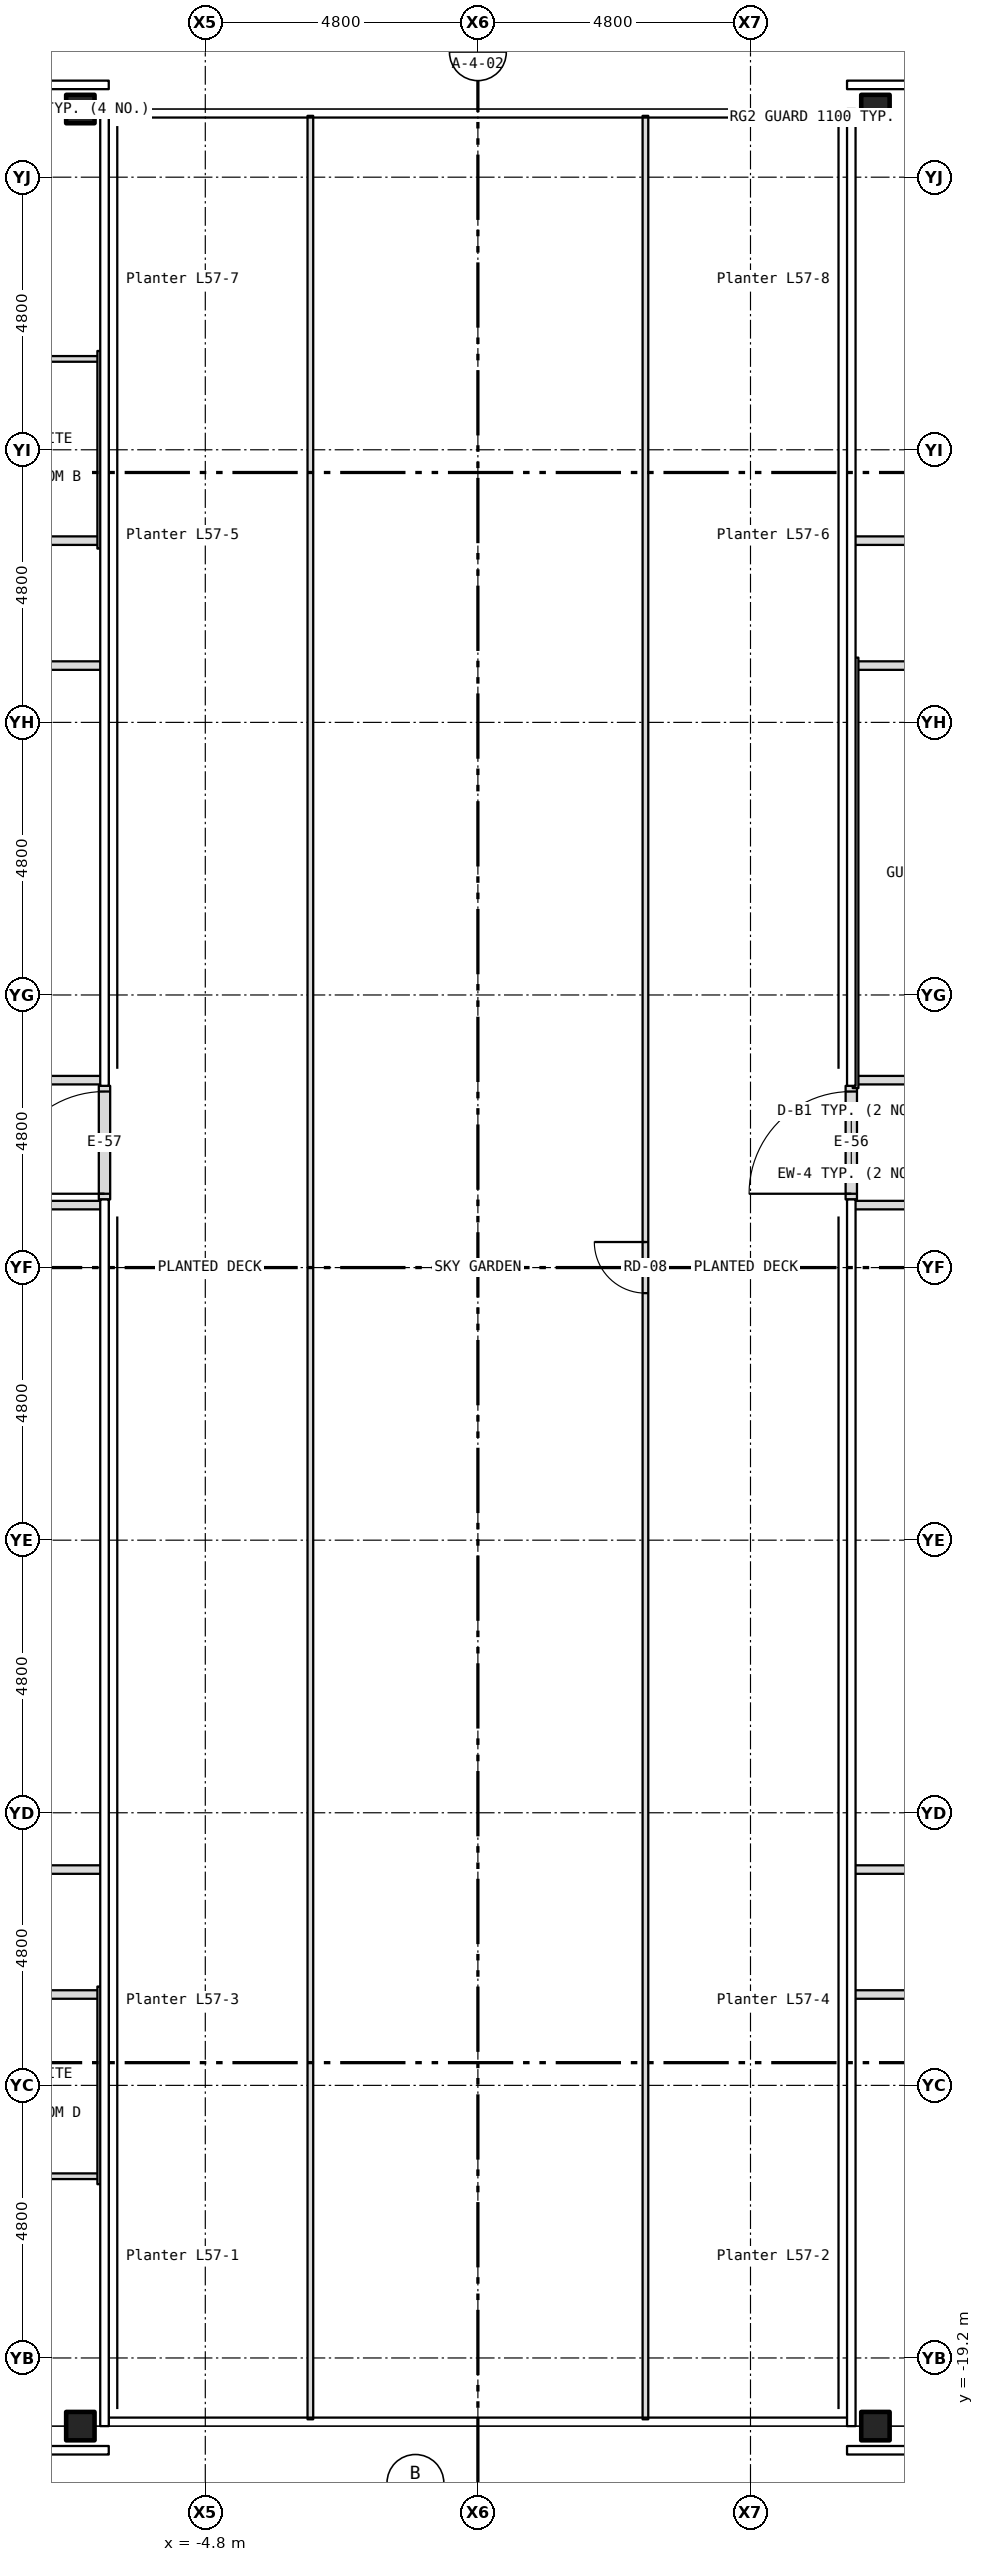
"""IFC4 building model, lengths in metres.
Left out: names, types, materials, properties, quantities, classifications, styles, units other than length and angle.
Written with IfcOpenShell. Run it as: python <this file> out.ifc"""

import sys

from ifc_helpers import new_model, si_unit, direction, frame, frame_2d, origin, origin_2d, place, context, subcontext, project, spatial, rectangle, hollow_rectangle, extrude, element, fill, save


model = new_model("IFC4")
c1 = context("Model", 3, precision=1e-05, world=origin(), true_north=direction((0.0, 1.0)))
c2 = subcontext(c1, "Body", "Model", "MODEL_VIEW")
j1 = project(units=[si_unit("LENGTHUNIT", "METRE"), si_unit("PLANEANGLEUNIT", "RADIAN")], contexts=[c1])
p1 = place(None, origin())
s1 = spatial("IfcSite", under=j1, at=p1, CompositionType="ELEMENT")
p2 = place(p1, origin())
s2 = spatial("IfcBuilding", under=s1, at=p2, CompositionType="ELEMENT")
p3 = place(p2, frame((0.0, 0.0, 219.0)))
s3 = spatial("IfcBuildingStorey", under=s2, at=p3, CompositionType="ELEMENT", Elevation=219.0)
for number, where, z_axis, x_axis in (
    (1, (-7.0, 20.4, -0.15), (0.0, 0.0, 1.0), (1.0, 0.0, 0.0)),
    (2, (-7.0, -20.4, -0.15), (0.0, 0.0, 1.0), (1.0, 0.0, 0.0)),
    (3, (7.0, 20.4, -0.15), (0.0, 0.0, 1.0), (1.0, 0.0, 0.0)),
    (4, (7.0, -20.4, -0.15), (0.0, 0.0, 1.0), (1.0, 0.0, 0.0)),
):
    element("IfcColumn", number, at=place(p3, frame(where, z_axis=z_axis, x_axis=x_axis)), inside=s3, PredefinedType="COLUMN", context=c2, shape_type="SweptSolid", body=[
        extrude(hollow_rectangle(XDim=0.5, YDim=0.5, WallThickness=0.03, at=origin_2d()), origin(), (0.0, 0.0, 1.0), 3.5),
    ])
p4 = place(p3, frame((6.575, 1.2, 0.0), z_axis=(0.0, 0.0, 1.0), x_axis=(0.0, 1.0, 0.0)))
e5 = element("IfcWall", 5, at=p4, inside=s3, PredefinedType="SOLIDWALL", context=c2, shape_type="SweptSolid", body=[
    extrude(rectangle(XDim=2.0, YDim=0.2, at=frame_2d((1.0, 0.0))), origin(), (0.0, 0.0, 1.0), 2.593),
])
p5 = place(p4, frame((0.1, 0.0, 0.0)))
e6 = element("IfcOpeningElement", 6, at=p5, cuts=e5, PredefinedType="OPENING", context=c2, shape_type="SweptSolid", body=[
    extrude(rectangle(XDim=1.8, YDim=2.1, at=frame_2d((0.9, 1.05))), frame((0.0, 0.112, 0.0), z_axis=(0.0, -1.0, 0.0), x_axis=(1.0, 0.0, 0.0)), (0.0, 0.0, 1.0), 0.224),
])
p6 = place(p3, frame((-6.575, 1.2, 0.0), z_axis=(0.0, 0.0, 1.0), x_axis=(0.0, 1.0, 0.0)))
e7 = element("IfcWall", 7, at=p6, inside=s3, PredefinedType="SOLIDWALL", context=c2, shape_type="SweptSolid", body=[
    extrude(rectangle(XDim=2.0, YDim=0.2, at=frame_2d((1.0, 0.0))), origin(), (0.0, 0.0, 1.0), 2.593),
])
p7 = place(p6, frame((0.1, 0.0, 0.0)))
e8 = element("IfcOpeningElement", 8, at=p7, cuts=e7, PredefinedType="OPENING", context=c2, shape_type="SweptSolid", body=[
    extrude(rectangle(XDim=1.8, YDim=2.1, at=frame_2d((0.9, 1.05))), frame((0.0, 0.112, 0.0), z_axis=(0.0, -1.0, 0.0), x_axis=(1.0, 0.0, 0.0)), (0.0, 0.0, 1.0), 0.224),
])
p8 = place(p3, frame((-8.85, -16.0, 0.0), z_axis=(0.0, 0.0, 1.0), x_axis=(1.0, 0.0, 0.0)))
e9 = element("IfcWall", 9, at=p8, inside=s3, PredefinedType="PARTITIONING", context=c2, shape_type="SweptSolid", body=[
    extrude(rectangle(XDim=2.2, YDim=0.1, at=frame_2d((1.1, 0.0))), origin(), (0.0, 0.0, 1.0), 3.35),
])
p9 = place(p3, frame((-15.8, -12.8, 0.0), z_axis=(0.0, 0.0, 1.0), x_axis=(1.0, 0.0, 0.0)))
e10 = element("IfcWall", 10, at=p9, inside=s3, PredefinedType="PARTITIONING", context=c2, shape_type="SweptSolid", body=[
    extrude(rectangle(XDim=9.15, YDim=0.15, at=frame_2d((4.575, 0.0))), origin(), (0.0, 0.0, 1.0), 3.35),
])
p10 = place(p9, frame((4.667, 0.0, 0.0)))
e11 = element("IfcOpeningElement", 11, at=p10, cuts=e10, PredefinedType="OPENING", context=c2, shape_type="SweptSolid", body=[
    extrude(rectangle(XDim=1.0, YDim=2.1, at=frame_2d((0.5, 1.05))), frame((0.0, 0.087, 0.0), z_axis=(0.0, -1.0, 0.0), x_axis=(1.0, 0.0, 0.0)), (0.0, 0.0, 1.0), 0.174),
])
p11 = place(p9, frame((1.192, 0.0, 0.0)))
e12 = element("IfcOpeningElement", 12, at=p11, cuts=e10, PredefinedType="OPENING", context=c2, shape_type="SweptSolid", body=[
    extrude(rectangle(XDim=1.0, YDim=2.1, at=frame_2d((0.5, 1.05))), frame((0.0, 0.087, 0.0), z_axis=(0.0, -1.0, 0.0), x_axis=(1.0, 0.0, 0.0)), (0.0, 0.0, 1.0), 0.174),
])
p12 = place(p3, frame((6.62, -12.8, 0.0), z_axis=(0.0, 0.0, 1.0), x_axis=(1.0, 0.0, 0.0)))
e13 = element("IfcWall", 13, at=p12, inside=s3, PredefinedType="PARTITIONING", context=c2, shape_type="SweptSolid", body=[
    extrude(rectangle(XDim=9.18, YDim=0.15, at=frame_2d((4.59, 0.0))), origin(), (0.0, 0.0, 1.0), 3.35),
])
p13 = place(p12, frame((1.314, 0.0, 0.0)))
e14 = element("IfcOpeningElement", 14, at=p13, cuts=e13, PredefinedType="OPENING", context=c2, shape_type="SweptSolid", body=[
    extrude(rectangle(XDim=1.0, YDim=2.1, at=frame_2d((0.5, 1.05))), frame((0.0, 0.087, 0.0), z_axis=(0.0, -1.0, 0.0), x_axis=(1.0, 0.0, 0.0)), (0.0, 0.0, 1.0), 0.174),
])
p14 = place(p12, frame((6.988, 0.0, 0.0)))
e15 = element("IfcOpeningElement", 15, at=p14, cuts=e13, PredefinedType="OPENING", context=c2, shape_type="SweptSolid", body=[
    extrude(rectangle(XDim=1.0, YDim=2.1, at=frame_2d((0.5, 1.05))), frame((0.0, 0.087, 0.0), z_axis=(0.0, -1.0, 0.0), x_axis=(1.0, 0.0, 0.0)), (0.0, 0.0, 1.0), 0.174),
])
for number, where, z_axis, x_axis in (
    (16, (-12.8, -10.6, 0.0), (0.0, 0.0, 1.0), (1.0, 0.0, 0.0)),
    (17, (6.62, -10.6, 0.0), (0.0, 0.0, 1.0), (1.0, 0.0, 0.0)),
):
    element("IfcWall", number, at=place(p3, frame(where, z_axis=z_axis, x_axis=x_axis)), inside=s3, PredefinedType="PARTITIONING", context=c2, shape_type="SweptSolid", body=[
        extrude(rectangle(XDim=6.18, YDim=0.15, at=frame_2d((3.09, 0.0))), origin(), (0.0, 0.0, 1.0), 3.35),
    ])
for number, where, z_axis, x_axis in (
    (18, (-9.436, 1.1, 0.0), (0.0, 0.0, 1.0), (1.0, 0.0, 0.0)),
    (19, (6.62, 1.1, 0.0), (0.0, 0.0, 1.0), (1.0, 0.0, 0.0)),
):
    element("IfcWall", number, at=place(p3, frame(where, z_axis=z_axis, x_axis=x_axis)), inside=s3, PredefinedType="PARTITIONING", context=c2, shape_type="SweptSolid", body=[
        extrude(rectangle(XDim=2.816, YDim=0.15, at=frame_2d((1.408, 0.0))), origin(), (0.0, 0.0, 1.0), 2.593),
    ])
p15 = place(p3, frame((-12.8, 3.3, 0.0), z_axis=(0.0, 0.0, 1.0), x_axis=(1.0, 0.0, 0.0)))
e20 = element("IfcWall", 20, at=p15, inside=s3, PredefinedType="PARTITIONING", context=c2, shape_type="SweptSolid", body=[
    extrude(rectangle(XDim=6.18, YDim=0.15, at=frame_2d((3.09, 0.0))), origin(), (0.0, 0.0, 1.0), 3.35),
])
p16 = place(p3, frame((6.65, 3.3, 0.0), z_axis=(0.0, 0.0, 1.0), x_axis=(1.0, 0.0, 0.0)))
e21 = element("IfcWall", 21, at=p16, inside=s3, PredefinedType="PARTITIONING", context=c2, shape_type="SweptSolid", body=[
    extrude(rectangle(XDim=6.15, YDim=0.15, at=frame_2d((3.075, 0.0))), origin(), (0.0, 0.0, 1.0), 3.35),
])
p17 = place(p16, frame((1.087, 0.0, 0.0)))
e22 = element("IfcOpeningElement", 22, at=p17, cuts=e21, PredefinedType="OPENING", context=c2, shape_type="SweptSolid", body=[
    extrude(rectangle(XDim=0.9, YDim=2.1, at=frame_2d((0.45, 1.05))), frame((0.0, 0.087, 0.0), z_axis=(0.0, -1.0, 0.0), x_axis=(1.0, 0.0, 0.0)), (0.0, 0.0, 1.0), 0.174),
])
p18 = place(p3, frame((-12.8, 10.6, 0.0), z_axis=(0.0, 0.0, 1.0), x_axis=(1.0, 0.0, 0.0)))
e23 = element("IfcWall", 23, at=p18, inside=s3, PredefinedType="PARTITIONING", context=c2, shape_type="SweptSolid", body=[
    extrude(rectangle(XDim=6.18, YDim=0.15, at=frame_2d((3.09, 0.0))), origin(), (0.0, 0.0, 1.0), 3.35),
])
p19 = place(p3, frame((6.65, 10.6, 0.0), z_axis=(0.0, 0.0, 1.0), x_axis=(1.0, 0.0, 0.0)))
e24 = element("IfcWall", 24, at=p19, inside=s3, PredefinedType="PARTITIONING", context=c2, shape_type="SweptSolid", body=[
    extrude(rectangle(XDim=6.15, YDim=0.15, at=frame_2d((3.075, 0.0))), origin(), (0.0, 0.0, 1.0), 3.35),
])
p20 = place(p3, frame((-15.8, 12.8, 0.0), z_axis=(0.0, 0.0, 1.0), x_axis=(1.0, 0.0, 0.0)))
e25 = element("IfcWall", 25, at=p20, inside=s3, PredefinedType="PARTITIONING", context=c2, shape_type="SweptSolid", body=[
    extrude(rectangle(XDim=9.15, YDim=0.15, at=frame_2d((4.575, 0.0))), origin(), (0.0, 0.0, 1.0), 3.35),
])
p21 = place(p20, frame((4.667, 0.0, 0.0)))
e26 = element("IfcOpeningElement", 26, at=p21, cuts=e25, PredefinedType="OPENING", context=c2, shape_type="SweptSolid", body=[
    extrude(rectangle(XDim=1.0, YDim=2.1, at=frame_2d((0.5, 1.05))), frame((0.0, 0.087, 0.0), z_axis=(0.0, -1.0, 0.0), x_axis=(1.0, 0.0, 0.0)), (0.0, 0.0, 1.0), 0.174),
])
p22 = place(p20, frame((1.192, 0.0, 0.0)))
e27 = element("IfcOpeningElement", 27, at=p22, cuts=e25, PredefinedType="OPENING", context=c2, shape_type="SweptSolid", body=[
    extrude(rectangle(XDim=1.0, YDim=2.1, at=frame_2d((0.5, 1.05))), frame((0.0, 0.087, 0.0), z_axis=(0.0, -1.0, 0.0), x_axis=(1.0, 0.0, 0.0)), (0.0, 0.0, 1.0), 0.174),
])
p23 = place(p3, frame((6.62, 12.8, 0.0), z_axis=(0.0, 0.0, 1.0), x_axis=(1.0, 0.0, 0.0)))
e28 = element("IfcWall", 28, at=p23, inside=s3, PredefinedType="PARTITIONING", context=c2, shape_type="SweptSolid", body=[
    extrude(rectangle(XDim=9.18, YDim=0.15, at=frame_2d((4.59, 0.0))), origin(), (0.0, 0.0, 1.0), 3.35),
])
p24 = place(p23, frame((1.314, 0.0, 0.0)))
e29 = element("IfcOpeningElement", 29, at=p24, cuts=e28, PredefinedType="OPENING", context=c2, shape_type="SweptSolid", body=[
    extrude(rectangle(XDim=1.0, YDim=2.1, at=frame_2d((0.5, 1.05))), frame((0.0, 0.087, 0.0), z_axis=(0.0, -1.0, 0.0), x_axis=(1.0, 0.0, 0.0)), (0.0, 0.0, 1.0), 0.174),
])
p25 = place(p23, frame((6.988, 0.0, 0.0)))
e30 = element("IfcOpeningElement", 30, at=p25, cuts=e28, PredefinedType="OPENING", context=c2, shape_type="SweptSolid", body=[
    extrude(rectangle(XDim=1.0, YDim=2.1, at=frame_2d((0.5, 1.05))), frame((0.0, 0.087, 0.0), z_axis=(0.0, -1.0, 0.0), x_axis=(1.0, 0.0, 0.0)), (0.0, 0.0, 1.0), 0.174),
])
p26 = place(p3, frame((-8.85, 16.0, 0.0), z_axis=(0.0, 0.0, 1.0), x_axis=(1.0, 0.0, 0.0)))
e31 = element("IfcWall", 31, at=p26, inside=s3, PredefinedType="PARTITIONING", context=c2, shape_type="SweptSolid", body=[
    extrude(rectangle(XDim=2.2, YDim=0.1, at=frame_2d((1.1, 0.0))), origin(), (0.0, 0.0, 1.0), 3.35),
])
for number, where, z_axis, x_axis in (
    (32, (-6.65, -16.14, 0.0), (0.0, 0.0, 1.0), (0.0, 1.0, 0.0)),
    (33, (-6.65, 12.66, 0.0), (0.0, 0.0, 1.0), (0.0, 1.0, 0.0)),
):
    element("IfcWall", number, at=place(p3, frame(where, z_axis=z_axis, x_axis=x_axis)), inside=s3, PredefinedType="PARTITIONING", context=c2, shape_type="SweptSolid", body=[
        extrude(rectangle(XDim=3.48, YDim=0.1, at=frame_2d((1.74, 0.0))), origin(), (0.0, 0.0, 1.0), 3.35),
    ])
p27 = place(p3, frame((-2.95, -20.28, 0.0), z_axis=(0.0, 0.0, 1.0), x_axis=(0.0, 1.0, 0.0)))
e34 = element("IfcWall", 34, at=p27, inside=s3, PredefinedType="PARTITIONING", context=c2, shape_type="SweptSolid", body=[
    extrude(rectangle(XDim=40.56, YDim=0.1, at=frame_2d((20.28, 0.0))), origin(), (0.0, 0.0, 1.0), 3.35),
])
p28 = place(p3, frame((2.95, -20.28, 0.0), z_axis=(0.0, 0.0, 1.0), x_axis=(0.0, 1.0, 0.0)))
e35 = element("IfcWall", 35, at=p28, inside=s3, PredefinedType="PARTITIONING", context=c2, shape_type="SweptSolid", body=[
    extrude(rectangle(XDim=40.56, YDim=0.1, at=frame_2d((20.28, 0.0))), origin(), (0.0, 0.0, 1.0), 3.35),
])
p29 = place(p28, frame((19.83, 0.0, 0.0)))
e36 = element("IfcOpeningElement", 36, at=p29, cuts=e35, PredefinedType="OPENING", context=c2, shape_type="SweptSolid", body=[
    extrude(rectangle(XDim=0.9, YDim=2.1, at=frame_2d((0.45, 1.05))), frame((0.0, 0.062, 0.0), z_axis=(0.0, -1.0, 0.0), x_axis=(1.0, 0.0, 0.0)), (0.0, 0.0, 1.0), 0.124),
])
p30 = place(p3, frame((6.65, 3.16, 0.0), z_axis=(0.0, 0.0, 1.0), x_axis=(0.0, 1.0, 0.0)))
e37 = element("IfcWall", 37, at=p30, inside=s3, PredefinedType="PARTITIONING", context=c2, shape_type="SweptSolid", body=[
    extrude(rectangle(XDim=7.58, YDim=0.1, at=frame_2d((3.79, 0.0))), origin(), (0.0, 0.0, 1.0), 3.35),
])
p31 = place(p5, origin())
e38 = element("IfcDoor", 38, at=p31, inside=s3, OperationType="DOUBLE_DOOR_DOUBLE_SWING", PredefinedType="DOOR", context=c2, shape_type="SweptSolid", body=[
    extrude(rectangle(XDim=1.8, YDim=2.1, at=frame_2d((0.9, 1.05))), frame((0.0, 0.025, 0.0), z_axis=(0.0, -1.0, 0.0), x_axis=(1.0, 0.0, 0.0)), (0.0, 0.0, 1.0), 0.05),
])
fill(e6, e38)
p32 = place(p7, origin())
e39 = element("IfcDoor", 39, at=p32, inside=s3, OperationType="DOUBLE_DOOR_DOUBLE_SWING", PredefinedType="DOOR", context=c2, shape_type="SweptSolid", body=[
    extrude(rectangle(XDim=1.8, YDim=2.1, at=frame_2d((0.9, 1.05))), frame((0.0, 0.025, 0.0), z_axis=(0.0, -1.0, 0.0), x_axis=(1.0, 0.0, 0.0)), (0.0, 0.0, 1.0), 0.05),
])
fill(e8, e39)
p33 = place(p29, origin())
e40 = element("IfcDoor", 40, at=p33, inside=s3, OperationType="SINGLE_SWING_RIGHT", PredefinedType="DOOR", context=c2, shape_type="SweptSolid", body=[
    extrude(rectangle(XDim=0.9, YDim=2.1, at=frame_2d((0.45, 1.05))), frame((0.0, 0.025, 0.0), z_axis=(0.0, -1.0, 0.0), x_axis=(1.0, 0.0, 0.0)), (0.0, 0.0, 1.0), 0.05),
])
fill(e36, e40)
save(model, sys.argv[1])
